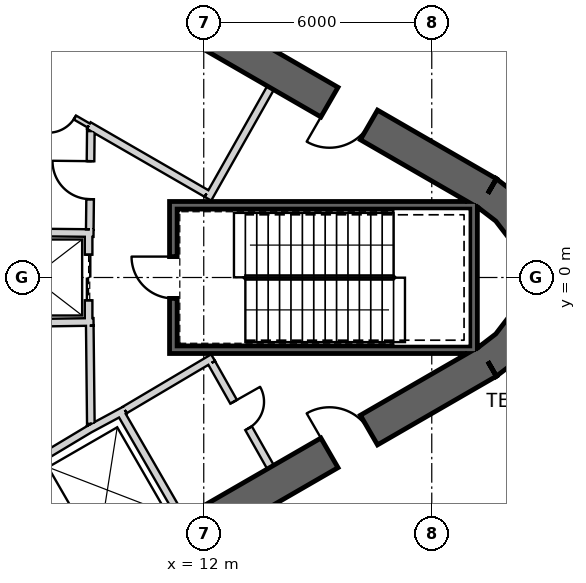
"""IFC4 building model, lengths in metres.
Left out: names, types, materials, properties, quantities, classifications, styles, units other than length and angle.
Written with IfcOpenShell. Run it as: python <this file> out.ifc"""

import sys

from ifc_helpers import new_model, si_unit, direction, frame, frame_2d, origin, place, context, subcontext, project, spatial, polyline, rectangle, outline, extrude, element, fill, save


model = new_model("IFC4")
c1 = context("Model", 3, precision=1e-05, world=origin(), true_north=direction((0.0, 1.0)))
c2 = subcontext(c1, "Body", "Model", "MODEL_VIEW")
j1 = project(units=[si_unit("LENGTHUNIT", "METRE"), si_unit("PLANEANGLEUNIT", "RADIAN")], contexts=[c1])
p1 = place(None, origin())
s1 = spatial("IfcSite", under=j1, at=p1, CompositionType="ELEMENT")
p2 = place(p1, origin())
s2 = spatial("IfcBuilding", under=s1, at=p2, CompositionType="ELEMENT")
p3 = place(p2, frame((0.0, 0.0, 420.3)))
s3 = spatial("IfcBuildingStorey", under=s2, at=p3, CompositionType="ELEMENT", Elevation=420.3)
p4 = place(p3, frame((19.475, 2.208, 0.0), z_axis=(0.0, 0.0, 1.0), x_axis=(-0.866028369851, 0.499994862586, 0.0)))
e1 = element("IfcWall", 1, at=p4, inside=s3, PredefinedType="SHEAR", context=c2, shape_type="SweptSolid", body=[
    extrude(rectangle(XDim=31.523, YDim=0.9, at=frame_2d((15.762, 0.0))), origin(), (0.0, 0.0, 1.0), 5.0),
])
p5 = place(p4, frame((3.612, 0.0, 0.0)))
e2 = element("IfcOpeningElement", 2, at=p5, cuts=e1, PredefinedType="OPENING", context=c2, shape_type="SweptSolid", body=[
    extrude(rectangle(XDim=1.2, YDim=2.4, at=frame_2d((0.6, 1.2))), frame((0.0, 0.46, 0.0), z_axis=(0.0, -1.0, 0.0), x_axis=(1.0, 0.0, 0.0)), (0.0, 0.0, 1.0), 0.92),
])
p6 = place(p4, frame((26.712, 0.0, 0.0)))
e3 = element("IfcOpeningElement", 3, at=p6, cuts=e1, PredefinedType="OPENING", context=c2, shape_type="SweptSolid", body=[
    extrude(rectangle(XDim=1.2, YDim=2.4, at=frame_2d((0.6, 1.2))), frame((0.0, 0.46, 0.0), z_axis=(0.0, -1.0, 0.0), x_axis=(1.0, 0.0, 0.0)), (0.0, 0.0, 1.0), 0.92),
])
p7 = place(p3, frame((-7.825, -17.97, 0.0), z_axis=(0.0, 0.0, 1.0), x_axis=(0.866028369851, 0.499994862586, 0.0)))
e4 = element("IfcWall", 4, at=p7, inside=s3, PredefinedType="SHEAR", context=c2, shape_type="SweptSolid", body=[
    extrude(rectangle(XDim=31.523, YDim=0.9, at=frame_2d((15.762, 0.0))), origin(), (0.0, 0.0, 1.0), 5.0),
])
p8 = place(p7, frame((17.862, 0.0, 0.0)))
e5 = element("IfcOpeningElement", 5, at=p8, cuts=e4, PredefinedType="OPENING", context=c2, shape_type="SweptSolid", body=[
    extrude(rectangle(XDim=1.2, YDim=2.4, at=frame_2d((0.6, 1.2))), frame((0.0, 0.46, 0.0), z_axis=(0.0, -1.0, 0.0), x_axis=(1.0, 0.0, 0.0)), (0.0, 0.0, 1.0), 0.92),
])
p9 = place(p7, frame((20.562, 0.0, 0.0)))
e6 = element("IfcOpeningElement", 6, at=p9, cuts=e4, PredefinedType="OPENING", context=c2, shape_type="SweptSolid", body=[
    extrude(rectangle(XDim=1.2, YDim=2.4, at=frame_2d((0.6, 1.2))), frame((0.0, 0.46, 0.0), z_axis=(0.0, -1.0, 0.0), x_axis=(1.0, 0.0, 0.0)), (0.0, 0.0, 1.0), 0.92),
])
p10 = place(p7, frame((26.712, 0.0, 0.0)))
e7 = element("IfcOpeningElement", 7, at=p10, cuts=e4, PredefinedType="OPENING", context=c2, shape_type="SweptSolid", body=[
    extrude(rectangle(XDim=1.2, YDim=2.4, at=frame_2d((0.6, 1.2))), frame((0.0, 0.46, 0.0), z_axis=(0.0, -1.0, 0.0), x_axis=(1.0, 0.0, 0.0)), (0.0, 0.0, 1.0), 0.92),
])
p11 = place(p7, frame((3.612, 0.0, 0.0)))
e8 = element("IfcOpeningElement", 8, at=p11, cuts=e4, PredefinedType="OPENING", context=c2, shape_type="SweptSolid", body=[
    extrude(rectangle(XDim=1.2, YDim=2.4, at=frame_2d((0.6, 1.2))), frame((0.0, 0.46, 0.0), z_axis=(0.0, -1.0, 0.0), x_axis=(1.0, 0.0, 0.0)), (0.0, 0.0, 1.0), 0.92),
])
p12 = place(p3, origin())
e9 = element("IfcWall", 9, at=p12, inside=s3, PredefinedType="SHEAR", context=c2, shape_type="SweptSolid", body=[
    extrude(outline(polyline([(19.7, -2.598), (20.321, -2.121), (20.798, -1.5), (21.098, -0.777), (21.2, 0.0), (21.098, 0.777), (20.798, 1.5), (20.321, 2.121), (19.7, 2.598), (19.25, 1.819), (19.685, 1.485), (20.019, 1.05), (20.229, 0.543), (20.3, 0.0), (20.229, -0.543), (20.019, -1.05), (19.685, -1.485), (19.25, -1.819), (19.7, -2.598)])), origin(), (0.0, 0.0, 1.0), 5.0),
])
p13 = place(p3, frame((23.866, 4.83, 0.0), z_axis=(0.0, 0.0, 1.0), x_axis=(-0.801975305826, 0.597357186987, 0.0)))
e10 = element("IfcWall", 10, at=p13, inside=s3, PredefinedType="SOLIDWALL", context=c2, shape_type="SweptSolid", body=[
    extrude(rectangle(XDim=7.34, YDim=0.24, at=frame_2d((3.67, 0.0))), origin(), (0.0, 0.0, 1.0), 4.75),
])
p14 = place(p3, frame((17.127, -7.729, 0.0), z_axis=(0.0, 0.0, 1.0), x_axis=(0.918306180975, 0.395870885497, 0.0)))
e11 = element("IfcWall", 11, at=p14, inside=s3, PredefinedType="SOLIDWALL", context=c2, shape_type="SweptSolid", body=[
    extrude(rectangle(XDim=7.349, YDim=0.24, at=frame_2d((3.675, 0.0))), origin(), (0.0, 0.0, 1.0), 4.75),
])
p15 = place(p3, frame((25.85, -4.964, 0.04), z_axis=(0.0, 0.0, 1.0), x_axis=(-0.918309857205, -0.395862357594, 0.0)))
e12 = element("IfcWall", 12, at=p15, inside=s3, PredefinedType="PARAPET", context=c2, shape_type="SweptSolid", body=[
    extrude(rectangle(XDim=7.958, YDim=0.25, at=frame_2d((3.979, 0.0))), origin(), (0.0, 0.0, 1.0), 1.2),
])
p16 = place(p3, frame((19.459, 9.741, 0.04), z_axis=(0.0, 0.0, 1.0), x_axis=(0.801989479124, -0.597338158311, 0.0)))
e13 = element("IfcWall", 13, at=p16, inside=s3, PredefinedType="PARAPET", context=c2, shape_type="SweptSolid", body=[
    extrude(rectangle(XDim=7.934, YDim=0.25, at=frame_2d((3.967, 0.0))), origin(), (0.0, 0.0, 1.0), 1.2),
])
p17 = place(p3, frame((25.006, -4.728, 0.04), z_axis=(0.0, 0.0, 1.0), x_axis=(-0.918311377088, -0.395858831795, 0.0)))
e14 = element("IfcWall", 14, at=p17, inside=s3, PredefinedType="PARAPET", context=c2, shape_type="SweptSolid", body=[
    extrude(rectangle(XDim=6.742, YDim=0.5, at=frame_2d((3.371, 0.0))), origin(), (0.0, 0.0, 1.0), 0.6),
])
p18 = place(p3, frame((19.645, 8.917, 0.04), z_axis=(0.0, 0.0, 1.0), x_axis=(0.801983344153, -0.597346395069, 0.0)))
e15 = element("IfcWall", 15, at=p18, inside=s3, PredefinedType="PARAPET", context=c2, shape_type="SweptSolid", body=[
    extrude(rectangle(XDim=6.662, YDim=0.5, at=frame_2d((3.331, 0.0))), origin(), (0.0, 0.0, 1.0), 0.6),
])
p19 = place(p3, frame((9.795, -3.525, 0.0), z_axis=(0.0, 0.0, 1.0), x_axis=(0.499984717929, -0.866034226713, 0.0)))
e16 = element("IfcWall", 16, at=p19, inside=s3, PredefinedType="PLUMBINGWALL", context=c2, shape_type="SweptSolid", body=[
    extrude(rectangle(XDim=3.25, YDim=0.2, at=frame_2d((1.625, 0.0))), origin(), (0.0, 0.0, 1.0), 4.75),
])
p20 = place(p3, frame((8.974, -3.999, 0.0), z_axis=(0.0, 0.0, 1.0), x_axis=(0.880907015104, 0.473289373154, 0.0)))
e17 = element("IfcWall", 17, at=p20, inside=s3, PredefinedType="PLUMBINGWALL", context=c2, shape_type="SweptSolid", body=[
    extrude(rectangle(XDim=1.078, YDim=0.2, at=frame_2d((0.539, 0.0))), origin(), (0.0, 0.0, 1.0), 4.75),
])
p21 = place(p3, frame((7.497, -4.886, 0.0), z_axis=(0.0, 0.0, 1.0), x_axis=(0.857516281273, 0.51445682749, 0.0)))
e18 = element("IfcWall", 18, at=p21, inside=s3, PredefinedType="PLUMBINGWALL", context=c2, shape_type="SweptSolid", body=[
    extrude(rectangle(XDim=1.845, YDim=0.2, at=frame_2d((0.922, 0.0))), origin(), (0.0, 0.0, 1.0), 4.75),
])
p22 = place(p3, frame((19.2, 1.9, -0.25), z_axis=(0.0, 0.0, 1.0), x_axis=(-1.0, 0.0, 0.0)))
e19 = element("IfcWall", 19, at=p22, inside=s3, PredefinedType="SHEAR", context=c2, shape_type="SweptSolid", body=[
    extrude(rectangle(XDim=8.1, YDim=0.2, at=frame_2d((4.05, 0.0))), origin(), (0.0, 0.0, 1.0), 5.0),
])
p23 = place(p3, frame((19.1, -2.0, -0.25), z_axis=(0.0, 0.0, 1.0), x_axis=(0.0, 1.0, 0.0)))
e20 = element("IfcWall", 20, at=p23, inside=s3, PredefinedType="SHEAR", context=c2, shape_type="SweptSolid", body=[
    extrude(rectangle(XDim=3.8, YDim=0.2, at=frame_2d((1.9, 0.0))), origin(), (0.0, 0.0, 1.0), 5.0),
])
p24 = place(p3, frame((11.1, -1.9, -0.25), z_axis=(0.0, 0.0, 1.0), x_axis=(1.0, 0.0, 0.0)))
e21 = element("IfcWall", 21, at=p24, inside=s3, PredefinedType="SHEAR", context=c2, shape_type="SweptSolid", body=[
    extrude(rectangle(XDim=7.9, YDim=0.2, at=frame_2d((3.95, 0.0))), origin(), (0.0, 0.0, 1.0), 5.0),
])
p25 = place(p3, frame((11.2, -1.8, -0.25), z_axis=(0.0, 0.0, 1.0), x_axis=(0.0, 1.0, 0.0)))
e22 = element("IfcWall", 22, at=p25, inside=s3, PredefinedType="SHEAR", context=c2, shape_type="SweptSolid", body=[
    extrude(rectangle(XDim=3.6, YDim=0.2, at=frame_2d((1.8, 0.0))), origin(), (0.0, 0.0, 1.0), 5.0),
])
p26 = place(p25, frame((1.25, 0.0, 0.25)))
e23 = element("IfcOpeningElement", 23, at=p26, cuts=e22, PredefinedType="OPENING", context=c2, shape_type="SweptSolid", body=[
    extrude(rectangle(XDim=1.1, YDim=2.1, at=frame_2d((0.55, 1.05))), frame((0.0, 0.11, 0.0), z_axis=(0.0, -1.0, 0.0), x_axis=(1.0, 0.0, 0.0)), (0.0, 0.0, 1.0), 0.22),
])
p27 = place(p3, frame((8.97, 1.2, 0.0), z_axis=(0.0, 0.0, 1.0), x_axis=(0.0, -1.0, 0.0)))
e24 = element("IfcWall", 24, at=p27, inside=s3, PredefinedType="PLUMBINGWALL", context=c2, shape_type="SweptSolid", body=[
    extrude(rectangle(XDim=2.4, YDim=0.2, at=frame_2d((1.2, 0.0))), origin(), (0.0, 0.0, 1.0), 4.75),
])
p28 = place(p27, frame((0.6, 0.0, 0.0)))
e25 = element("IfcOpeningElement", 25, at=p28, cuts=e24, PredefinedType="OPENING", context=c2, shape_type="SweptSolid", body=[
    extrude(rectangle(XDim=1.2, YDim=2.4, at=frame_2d((0.6, 1.2))), frame((0.0, 0.11, 0.0), z_axis=(0.0, -1.0, 0.0), x_axis=(1.0, 0.0, 0.0)), (0.0, 0.0, 1.0), 0.22),
])
p29 = place(p3, frame((9.1, -1.168, 0.0), z_axis=(0.0, 0.0, 1.0), x_axis=(-0.999896137355, -0.014412303875, 0.0)))
e26 = element("IfcWall", 26, at=p29, inside=s3, PredefinedType="PLUMBINGWALL", context=c2, shape_type="SweptSolid", body=[
    extrude(rectangle(XDim=2.151, YDim=0.2, at=frame_2d((1.076, 0.0))), origin(), (0.0, 0.0, 1.0), 4.75),
])
p30 = place(p3, frame((9.1, 1.169, 0.0), z_axis=(0.0, 0.0, 1.0), x_axis=(-0.99994990606, 0.010009264196, 0.0)))
e27 = element("IfcWall", 27, at=p30, inside=s3, PredefinedType="PLUMBINGWALL", context=c2, shape_type="SweptSolid", body=[
    extrude(rectangle(XDim=3.0, YDim=0.2, at=frame_2d((1.5, 0.0))), origin(), (0.0, 0.0, 1.0), 4.75),
])
p31 = place(p3, frame((12.11, 2.073, 0.0), z_axis=(0.0, 0.0, 1.0), x_axis=(0.49196600604, 0.870614408852, 0.0)))
e28 = element("IfcWall", 28, at=p31, inside=s3, PredefinedType="PARTITIONING", context=c2, shape_type="SweptSolid", body=[
    extrude(rectangle(XDim=3.35, YDim=0.2, at=frame_2d((1.675, 0.0))), origin(), (0.0, 0.0, 1.0), 4.75),
])
p32 = place(p3, frame((8.974, 3.999, 0.0), z_axis=(0.0, 0.0, 1.0), x_axis=(0.86601284211, -0.500021756827, 0.0)))
e29 = element("IfcWall", 29, at=p32, inside=s3, PredefinedType="PARTITIONING", context=c2, shape_type="SweptSolid", body=[
    extrude(rectangle(XDim=3.577, YDim=0.2, at=frame_2d((1.789, 0.0))), origin(), (0.0, 0.0, 1.0), 4.75),
])
p33 = place(p3, frame((7.55, 4.821, 0.0), z_axis=(0.0, 0.0, 1.0), x_axis=(0.866069384335, -0.499923815713, 0.0)))
e30 = element("IfcWall", 30, at=p33, inside=s3, PredefinedType="PARTITIONING", context=c2, shape_type="SweptSolid", body=[
    extrude(rectangle(XDim=1.644, YDim=0.12, at=frame_2d((0.822, 0.0))), origin(), (0.0, 0.0, 1.0), 4.75),
])
p34 = place(p33, frame((0.422, 0.0, 0.0)))
e31 = element("IfcOpeningElement", 31, at=p34, cuts=e30, PredefinedType="OPENING", context=c2, shape_type="SweptSolid", body=[
    extrude(rectangle(XDim=0.8, YDim=2.1, at=frame_2d((0.4, 1.05))), frame((0.0, 0.07, 0.0), z_axis=(0.0, -1.0, 0.0), x_axis=(1.0, 0.0, 0.0)), (0.0, 0.0, 1.0), 0.14),
])
p35 = place(p3, frame((12.245, -2.109, 0.0), z_axis=(0.0, 0.0, 1.0), x_axis=(-0.860414880418, -0.509594185166, 0.0)))
e32 = element("IfcWall", 32, at=p35, inside=s3, PredefinedType="PARTITIONING", context=c2, shape_type="SweptSolid", body=[
    extrude(rectangle(XDim=2.7, YDim=0.2, at=frame_2d((1.35, 0.0))), origin(), (0.0, 0.0, 1.0), 4.75),
])
p36 = place(p3, frame((13.758, -4.99, 0.0), z_axis=(0.0, 0.0, 1.0), x_axis=(-0.491993409184, 0.87059892334, 0.0)))
e33 = element("IfcWall", 33, at=p36, inside=s3, PredefinedType="PARTITIONING", context=c2, shape_type="SweptSolid", body=[
    extrude(rectangle(XDim=3.15, YDim=0.2, at=frame_2d((1.575, 0.0))), origin(), (0.0, 0.0, 1.0), 4.75),
])
p37 = place(p36, frame((1.175, 0.0, 0.0)))
e34 = element("IfcOpeningElement", 34, at=p37, cuts=e33, PredefinedType="OPENING", context=c2, shape_type="SweptSolid", body=[
    extrude(rectangle(XDim=0.8, YDim=2.1, at=frame_2d((0.4, 1.05))), frame((0.0, 0.11, 0.0), z_axis=(0.0, -1.0, 0.0), x_axis=(1.0, 0.0, 0.0)), (0.0, 0.0, 1.0), 0.22),
])
p38 = place(p3, frame((9.029, -3.851, 0.0), z_axis=(0.0, 0.0, 1.0), x_axis=(-0.010784614026, 0.999941844359, 0.0)))
e35 = element("IfcWall", 35, at=p38, inside=s3, PredefinedType="PARTITIONING", context=c2, shape_type="SweptSolid", body=[
    extrude(rectangle(XDim=2.581, YDim=0.2, at=frame_2d((1.291, 0.0))), origin(), (0.0, 0.0, 1.0), 4.75),
])
p39 = place(p3, frame((9.001, 1.27, 0.0), z_axis=(0.0, 0.0, 1.0), x_axis=(0.010780534828, 0.999941888346, 0.0)))
e36 = element("IfcWall", 36, at=p39, inside=s3, PredefinedType="PARTITIONING", context=c2, shape_type="SweptSolid", body=[
    extrude(rectangle(XDim=2.582, YDim=0.2, at=frame_2d((1.291, 0.0))), origin(), (0.0, 0.0, 1.0), 4.75),
])
p40 = place(p39, frame((0.791, 0.0, 0.0)))
e37 = element("IfcOpeningElement", 37, at=p40, cuts=e36, PredefinedType="OPENING", context=c2, shape_type="SweptSolid", body=[
    extrude(rectangle(XDim=1.0, YDim=2.1, at=frame_2d((0.5, 1.05))), frame((0.0, 0.11, 0.0), z_axis=(0.0, -1.0, 0.0), x_axis=(1.0, 0.0, 0.0)), (0.0, 0.0, 1.0), 0.22),
])
p41 = place(p26, origin())
e38 = element("IfcDoor", 38, at=p41, inside=s3, OperationType="SINGLE_SWING_RIGHT", PredefinedType="USERDEFINED", context=c2, shape_type="SweptSolid", body=[
    extrude(rectangle(XDim=1.1, YDim=2.1, at=frame_2d((0.55, 1.05))), frame((0.0, 0.025, 0.0), z_axis=(0.0, -1.0, 0.0), x_axis=(1.0, 0.0, 0.0)), (0.0, 0.0, 1.0), 0.05),
])
fill(e23, e38)
p42 = place(p40, origin())
e39 = element("IfcDoor", 39, at=p42, inside=s3, OperationType="SINGLE_SWING_RIGHT", PredefinedType="USERDEFINED", context=c2, shape_type="SweptSolid", body=[
    extrude(rectangle(XDim=1.0, YDim=2.1, at=frame_2d((0.5, 1.05))), frame((0.0, 0.025, 0.0), z_axis=(0.0, -1.0, 0.0), x_axis=(1.0, 0.0, 0.0)), (0.0, 0.0, 1.0), 0.05),
])
fill(e37, e39)
p43 = place(p28, origin())
e40 = element("IfcDoor", 40, at=p43, inside=s3, OperationType="SLIDING_TO_LEFT", PredefinedType="USERDEFINED", context=c2, shape_type="SweptSolid", body=[
    extrude(rectangle(XDim=1.2, YDim=2.4, at=frame_2d((0.6, 1.2))), frame((0.0, 0.025, 0.0), z_axis=(0.0, -1.0, 0.0), x_axis=(1.0, 0.0, 0.0)), (0.0, 0.0, 1.0), 0.05),
])
fill(e25, e40)
p44 = place(p34, origin())
e41 = element("IfcDoor", 41, at=p44, inside=s3, OperationType="SINGLE_SWING_LEFT", PredefinedType="USERDEFINED", context=c2, shape_type="SweptSolid", body=[
    extrude(rectangle(XDim=0.8, YDim=2.1, at=frame_2d((0.4, 1.05))), frame((0.0, 0.025, 0.0), z_axis=(0.0, -1.0, 0.0), x_axis=(1.0, 0.0, 0.0)), (0.0, 0.0, 1.0), 0.05),
])
fill(e31, e41)
p45 = place(p37, origin())
e42 = element("IfcDoor", 42, at=p45, inside=s3, OperationType="SINGLE_SWING_RIGHT", PredefinedType="USERDEFINED", context=c2, shape_type="SweptSolid", body=[
    extrude(rectangle(XDim=0.8, YDim=2.1, at=frame_2d((0.4, 1.05))), frame((0.0, 0.025, 0.0), z_axis=(0.0, -1.0, 0.0), x_axis=(1.0, 0.0, 0.0)), (0.0, 0.0, 1.0), 0.05),
])
fill(e34, e42)
p46 = place(p10, origin())
e43 = element("IfcDoor", 43, at=p46, inside=s3, OperationType="SINGLE_SWING_LEFT", PredefinedType="USERDEFINED", context=c2, shape_type="SweptSolid", body=[
    extrude(rectangle(XDim=1.2, YDim=2.4, at=frame_2d((0.6, 1.2))), frame((0.0, 0.025, 0.0), z_axis=(0.0, -1.0, 0.0), x_axis=(1.0, 0.0, 0.0)), (0.0, 0.0, 1.0), 0.05),
])
fill(e7, e43)
p47 = place(p5, origin())
e44 = element("IfcDoor", 44, at=p47, inside=s3, OperationType="SINGLE_SWING_RIGHT", PredefinedType="USERDEFINED", context=c2, shape_type="SweptSolid", body=[
    extrude(rectangle(XDim=1.2, YDim=2.4, at=frame_2d((0.6, 1.2))), frame((0.0, 0.025, 0.0), z_axis=(0.0, -1.0, 0.0), x_axis=(1.0, 0.0, 0.0)), (0.0, 0.0, 1.0), 0.05),
])
fill(e2, e44)
save(model, sys.argv[1])
